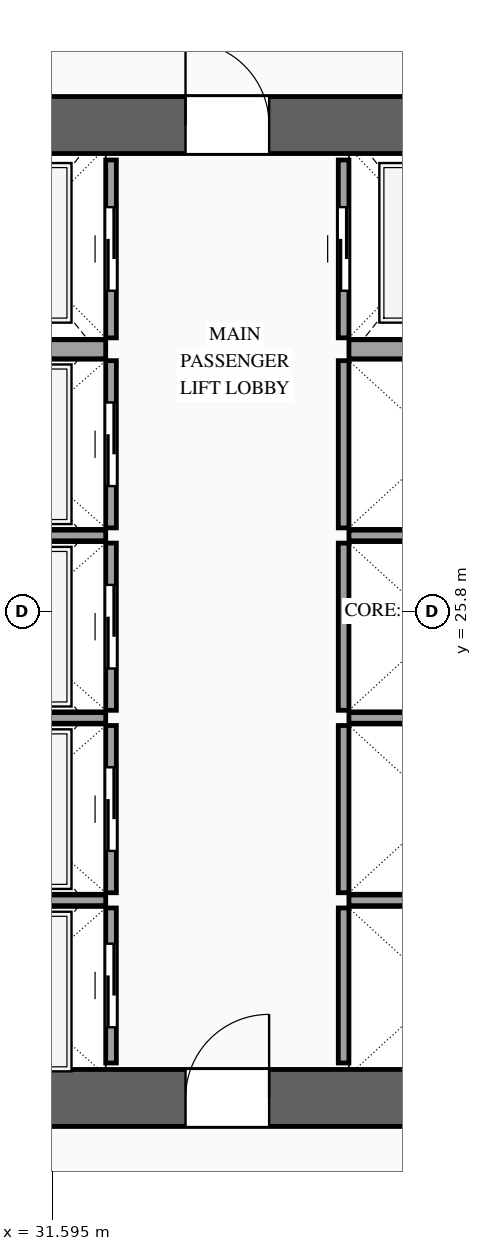
"""IFC4 building model, lengths in metres.
Left out: names, types, materials, properties, quantities, classifications, styles, units other than length and angle.
Written with IfcOpenShell. Run it as: python <this file> out.ifc"""

import sys

from ifc_helpers import new_model, si_unit, direction, frame, frame_2d, origin, place, context, subcontext, project, spatial, rectangle, extrude, source, transform, mapped, element, fill, save


model = new_model("IFC4")
c1 = context("Model", 3, precision=1e-05, world=origin(), true_north=direction((0.0, 1.0)))
c2 = subcontext(c1, "Body", "Model", "MODEL_VIEW")
j1 = project(units=[si_unit("LENGTHUNIT", "METRE"), si_unit("PLANEANGLEUNIT", "RADIAN")], contexts=[c1])
p1 = place(None, origin())
s1 = spatial("IfcSite", under=j1, at=p1, CompositionType="ELEMENT")
p2 = place(p1, origin())
s2 = spatial("IfcBuilding", under=s1, at=p2, CompositionType="ELEMENT")
p3 = place(p2, frame((0.0, 0.0, 85.6)))
s3 = spatial("IfcBuildingStorey", under=s2, at=p3, CompositionType="ELEMENT", Elevation=85.6)
p4 = place(p3, frame((23.425, 19.4, 0.0), z_axis=(0.0, 0.0, 1.0), x_axis=(1.0, 0.0, 0.0)))
e1 = element("IfcWall", 1, at=p4, inside=s3, PredefinedType="SHEAR", context=c2, shape_type="SweptSolid", body=[
    extrude(rectangle(XDim=27.15, YDim=0.75, at=frame_2d((13.575, 0.0))), origin(), (0.0, 0.0, 1.0), 4.6),
])
p5 = place(p4, frame((2.025, 0.0, 0.0)))
e2 = element("IfcOpeningElement", 2, at=p5, cuts=e1, PredefinedType="OPENING", context=c2, shape_type="SweptSolid", body=[
    extrude(rectangle(XDim=1.1, YDim=2.2, at=frame_2d((0.55, 1.1))), frame((0.0, 0.39, 0.0), z_axis=(0.0, -1.0, 0.0), x_axis=(1.0, 0.0, 0.0)), (0.0, 0.0, 1.0), 0.78),
])
p6 = place(p4, frame((9.925, 0.0, 0.0)))
e3 = element("IfcOpeningElement", 3, at=p6, cuts=e1, PredefinedType="OPENING", context=c2, shape_type="SweptSolid", body=[
    extrude(rectangle(XDim=1.1, YDim=2.2, at=frame_2d((0.55, 1.1))), frame((0.0, 0.39, 0.0), z_axis=(0.0, -1.0, 0.0), x_axis=(1.0, 0.0, 0.0)), (0.0, 0.0, 1.0), 0.78),
])
p7 = place(p4, frame((23.125, 0.0, 0.0)))
e4 = element("IfcOpeningElement", 4, at=p7, cuts=e1, PredefinedType="OPENING", context=c2, shape_type="SweptSolid", body=[
    extrude(rectangle(XDim=1.1, YDim=2.2, at=frame_2d((0.55, 1.1))), frame((0.0, 0.39, 0.0), z_axis=(0.0, -1.0, 0.0), x_axis=(1.0, 0.0, 0.0)), (0.0, 0.0, 1.0), 0.78),
])
p8 = place(p4, frame((19.745, 0.0, 0.0)))
e5 = element("IfcOpeningElement", 5, at=p8, cuts=e1, PredefinedType="OPENING", context=c2, shape_type="SweptSolid", body=[
    extrude(rectangle(XDim=0.9, YDim=2.15, at=frame_2d((0.45, 1.075))), frame((0.0, 0.39, 0.0), z_axis=(0.0, -1.0, 0.0), x_axis=(1.0, 0.0, 0.0)), (0.0, 0.0, 1.0), 0.78),
])
p9 = place(p3, frame((23.425, 32.2, 0.0), z_axis=(0.0, 0.0, 1.0), x_axis=(1.0, 0.0, 0.0)))
e6 = element("IfcWall", 6, at=p9, inside=s3, PredefinedType="SHEAR", context=c2, shape_type="SweptSolid", body=[
    extrude(rectangle(XDim=27.15, YDim=0.75, at=frame_2d((13.575, 0.0))), origin(), (0.0, 0.0, 1.0), 4.6),
])
p10 = place(p9, frame((4.645, 0.0, 0.0)))
e7 = element("IfcOpeningElement", 7, at=p10, cuts=e6, PredefinedType="OPENING", context=c2, shape_type="SweptSolid", body=[
    extrude(rectangle(XDim=0.9, YDim=2.15, at=frame_2d((0.45, 1.075))), frame((0.0, 0.39, 0.0), z_axis=(0.0, -1.0, 0.0), x_axis=(1.0, 0.0, 0.0)), (0.0, 0.0, 1.0), 0.78),
])
p11 = place(p9, frame((9.925, 0.0, 0.0)))
e8 = element("IfcOpeningElement", 8, at=p11, cuts=e6, PredefinedType="OPENING", context=c2, shape_type="SweptSolid", body=[
    extrude(rectangle(XDim=1.1, YDim=2.2, at=frame_2d((0.55, 1.1))), frame((0.0, 0.39, 0.0), z_axis=(0.0, -1.0, 0.0), x_axis=(1.0, 0.0, 0.0)), (0.0, 0.0, 1.0), 0.78),
])
p12 = place(p9, frame((15.775, 0.0, 0.0)))
e9 = element("IfcOpeningElement", 9, at=p12, cuts=e6, PredefinedType="OPENING", context=c2, shape_type="SweptSolid", body=[
    extrude(rectangle(XDim=1.1, YDim=2.2, at=frame_2d((0.55, 1.1))), frame((0.0, 0.39, 0.0), z_axis=(0.0, -1.0, 0.0), x_axis=(1.0, 0.0, 0.0)), (0.0, 0.0, 1.0), 0.78),
])
p13 = place(p9, frame((18.975, 0.0, 0.0)))
e10 = element("IfcOpeningElement", 10, at=p13, cuts=e6, PredefinedType="OPENING", context=c2, shape_type="SweptSolid", body=[
    extrude(rectangle(XDim=0.9, YDim=2.15, at=frame_2d((0.45, 1.075))), frame((0.0, 0.39, 0.0), z_axis=(0.0, -1.0, 0.0), x_axis=(1.0, 0.0, 0.0)), (0.0, 0.0, 1.0), 0.78),
])
p14 = place(p3, frame((32.37, 19.86, 0.0), z_axis=(0.0, 0.0, 1.0), x_axis=(0.0, 1.0, 0.0)))
e11 = element("IfcWall", 11, at=p14, inside=s3, PredefinedType="SOLIDWALL", context=c2, shape_type="SweptSolid", body=[
    extrude(rectangle(XDim=2.04, YDim=0.14, at=frame_2d((1.02, 0.0))), origin(), (0.0, 0.0, 1.0), 4.38),
])
p15 = place(p14, frame((0.47, 0.0, 0.0)))
e12 = element("IfcOpeningElement", 12, at=p15, cuts=e11, PredefinedType="OPENING", context=c2, shape_type="SweptSolid", body=[
    extrude(rectangle(XDim=1.1, YDim=2.2, at=frame_2d((0.55, 1.1))), frame((0.0, 0.085, 0.0), z_axis=(0.0, -1.0, 0.0), x_axis=(1.0, 0.0, 0.0)), (0.0, 0.0, 1.0), 0.17),
])
m1 = source(origin(), c2, "Body", "SweptSolid", [
    extrude(rectangle(XDim=2.5, YDim=0.14, at=frame_2d((1.25, 0.0))), origin(), (0.0, 0.0, 1.0), 4.38),
])
p16 = place(p3, frame((29.8, 22.0, 0.0), z_axis=(0.0, 0.0, 1.0), x_axis=(1.0, 0.0, 0.0)))
e13 = element("IfcWall", 13, at=p16, inside=s3, PredefinedType="SOLIDWALL", context=c2, shape_type="MappedRepresentation", body=[
    mapped(m1, transform((0.0, 0.0, 0.0), scale=1.0)),
])
p17 = place(p3, frame((32.37, 22.1, 0.0), z_axis=(0.0, 0.0, 1.0), x_axis=(0.0, 1.0, 0.0)))
e14 = element("IfcWall", 14, at=p17, inside=s3, PredefinedType="SOLIDWALL", context=c2, shape_type="SweptSolid", body=[
    extrude(rectangle(XDim=2.2, YDim=0.14, at=frame_2d((1.1, 0.0))), origin(), (0.0, 0.0, 1.0), 4.38),
])
p18 = place(p17, frame((0.55, 0.0, 0.0)))
e15 = element("IfcOpeningElement", 15, at=p18, cuts=e14, PredefinedType="OPENING", context=c2, shape_type="SweptSolid", body=[
    extrude(rectangle(XDim=1.1, YDim=2.2, at=frame_2d((0.55, 1.1))), frame((0.0, 0.085, 0.0), z_axis=(0.0, -1.0, 0.0), x_axis=(1.0, 0.0, 0.0)), (0.0, 0.0, 1.0), 0.17),
])
p19 = place(p3, frame((29.8, 24.4, 0.0), z_axis=(0.0, 0.0, 1.0), x_axis=(1.0, 0.0, 0.0)))
e16 = element("IfcWall", 16, at=p19, inside=s3, PredefinedType="SOLIDWALL", context=c2, shape_type="MappedRepresentation", body=[
    mapped(m1, transform((0.0, 0.0, 0.0), scale=1.0)),
])
p20 = place(p3, frame((32.37, 24.5, 0.0), z_axis=(0.0, 0.0, 1.0), x_axis=(0.0, 1.0, 0.0)))
e17 = element("IfcWall", 17, at=p20, inside=s3, PredefinedType="SOLIDWALL", context=c2, shape_type="SweptSolid", body=[
    extrude(rectangle(XDim=2.2, YDim=0.14, at=frame_2d((1.1, 0.0))), origin(), (0.0, 0.0, 1.0), 4.38),
])
p21 = place(p20, frame((0.55, 0.0, 0.0)))
e18 = element("IfcOpeningElement", 18, at=p21, cuts=e17, PredefinedType="OPENING", context=c2, shape_type="SweptSolid", body=[
    extrude(rectangle(XDim=1.1, YDim=2.2, at=frame_2d((0.55, 1.1))), frame((0.0, 0.085, 0.0), z_axis=(0.0, -1.0, 0.0), x_axis=(1.0, 0.0, 0.0)), (0.0, 0.0, 1.0), 0.17),
])
p22 = place(p3, frame((29.8, 26.8, 0.0), z_axis=(0.0, 0.0, 1.0), x_axis=(1.0, 0.0, 0.0)))
e19 = element("IfcWall", 19, at=p22, inside=s3, PredefinedType="SOLIDWALL", context=c2, shape_type="MappedRepresentation", body=[
    mapped(m1, transform((0.0, 0.0, 0.0), scale=1.0)),
])
p23 = place(p3, frame((32.37, 26.9, 0.0), z_axis=(0.0, 0.0, 1.0), x_axis=(0.0, 1.0, 0.0)))
e20 = element("IfcWall", 20, at=p23, inside=s3, PredefinedType="SOLIDWALL", context=c2, shape_type="SweptSolid", body=[
    extrude(rectangle(XDim=2.2, YDim=0.14, at=frame_2d((1.1, 0.0))), origin(), (0.0, 0.0, 1.0), 4.38),
])
p24 = place(p23, frame((0.55, 0.0, 0.0)))
e21 = element("IfcOpeningElement", 21, at=p24, cuts=e20, PredefinedType="OPENING", context=c2, shape_type="SweptSolid", body=[
    extrude(rectangle(XDim=1.1, YDim=2.2, at=frame_2d((0.55, 1.1))), frame((0.0, 0.085, 0.0), z_axis=(0.0, -1.0, 0.0), x_axis=(1.0, 0.0, 0.0)), (0.0, 0.0, 1.0), 0.17),
])
p25 = place(p3, frame((32.37, 29.4, 0.0), z_axis=(0.0, 0.0, 1.0), x_axis=(0.0, 1.0, 0.0)))
e22 = element("IfcWall", 22, at=p25, inside=s3, PredefinedType="SOLIDWALL", context=c2, shape_type="SweptSolid", body=[
    extrude(rectangle(XDim=2.34, YDim=0.14, at=frame_2d((1.17, 0.0))), origin(), (0.0, 0.0, 1.0), 4.38),
])
p26 = place(p25, frame((0.62, 0.0, 0.0)))
e23 = element("IfcOpeningElement", 23, at=p26, cuts=e22, PredefinedType="OPENING", context=c2, shape_type="SweptSolid", body=[
    extrude(rectangle(XDim=1.1, YDim=2.2, at=frame_2d((0.55, 1.1))), frame((0.0, 0.085, 0.0), z_axis=(0.0, -1.0, 0.0), x_axis=(1.0, 0.0, 0.0)), (0.0, 0.0, 1.0), 0.17),
])
m2 = source(origin(), c2, "Body", "SweptSolid", [
    extrude(rectangle(XDim=2.5, YDim=0.25, at=frame_2d((1.25, 0.0))), origin(), (0.0, 0.0, 1.0), 4.38),
])
p27 = place(p3, frame((29.8, 29.25, 0.0), z_axis=(0.0, 0.0, 1.0), x_axis=(1.0, 0.0, 0.0)))
e24 = element("IfcWall", 24, at=p27, inside=s3, PredefinedType="SOLIDWALL", context=c2, shape_type="MappedRepresentation", body=[
    mapped(m2, transform((0.0, 0.0, 0.0), scale=1.0)),
])
m3 = source(origin(), c2, "Body", "SweptSolid", [
    extrude(rectangle(XDim=2.04, YDim=0.14, at=frame_2d((1.02, 0.0))), origin(), (0.0, 0.0, 1.0), 4.38),
])
p28 = place(p3, frame((35.43, 19.86, 0.0), z_axis=(0.0, 0.0, 1.0), x_axis=(0.0, 1.0, 0.0)))
e25 = element("IfcWall", 25, at=p28, inside=s3, PredefinedType="SOLIDWALL", context=c2, shape_type="MappedRepresentation", body=[
    mapped(m3, transform((0.0, 0.0, 0.0), scale=1.0)),
])
m4 = source(origin(), c2, "Body", "SweptSolid", [
    extrude(rectangle(XDim=2.4, YDim=0.14, at=frame_2d((1.2, 0.0))), origin(), (0.0, 0.0, 1.0), 4.38),
])
p29 = place(p3, frame((35.5, 22.0, 0.0), z_axis=(0.0, 0.0, 1.0), x_axis=(1.0, 0.0, 0.0)))
e26 = element("IfcWall", 26, at=p29, inside=s3, PredefinedType="SOLIDWALL", context=c2, shape_type="MappedRepresentation", body=[
    mapped(m4, transform((0.0, 0.0, 0.0), scale=1.0)),
])
m5 = source(origin(), c2, "Body", "SweptSolid", [
    extrude(rectangle(XDim=2.2, YDim=0.14, at=frame_2d((1.1, 0.0))), origin(), (0.0, 0.0, 1.0), 4.38),
])
p30 = place(p3, frame((35.43, 22.1, 0.0), z_axis=(0.0, 0.0, 1.0), x_axis=(0.0, 1.0, 0.0)))
e27 = element("IfcWall", 27, at=p30, inside=s3, PredefinedType="SOLIDWALL", context=c2, shape_type="MappedRepresentation", body=[
    mapped(m5, transform((0.0, 0.0, 0.0), scale=1.0)),
])
p31 = place(p3, frame((35.5, 24.4, 0.0), z_axis=(0.0, 0.0, 1.0), x_axis=(1.0, 0.0, 0.0)))
e28 = element("IfcWall", 28, at=p31, inside=s3, PredefinedType="SOLIDWALL", context=c2, shape_type="MappedRepresentation", body=[
    mapped(m4, transform((0.0, 0.0, 0.0), scale=1.0)),
])
p32 = place(p3, frame((35.43, 24.5, 0.0), z_axis=(0.0, 0.0, 1.0), x_axis=(0.0, 1.0, 0.0)))
e29 = element("IfcWall", 29, at=p32, inside=s3, PredefinedType="SOLIDWALL", context=c2, shape_type="MappedRepresentation", body=[
    mapped(m5, transform((0.0, 0.0, 0.0), scale=1.0)),
])
p33 = place(p3, frame((35.5, 26.8, 0.0), z_axis=(0.0, 0.0, 1.0), x_axis=(1.0, 0.0, 0.0)))
e30 = element("IfcWall", 30, at=p33, inside=s3, PredefinedType="SOLIDWALL", context=c2, shape_type="MappedRepresentation", body=[
    mapped(m4, transform((0.0, 0.0, 0.0), scale=1.0)),
])
m6 = source(origin(), c2, "Body", "SweptSolid", [
    extrude(rectangle(XDim=2.2, YDim=0.14, at=frame_2d((1.1, 0.0))), origin(), (0.0, 0.0, 1.0), 4.38),
])
p34 = place(p3, frame((35.43, 26.9, 0.0), z_axis=(0.0, 0.0, 1.0), x_axis=(0.0, 1.0, 0.0)))
e31 = element("IfcWall", 31, at=p34, inside=s3, PredefinedType="SOLIDWALL", context=c2, shape_type="MappedRepresentation", body=[
    mapped(m6, transform((0.0, 0.0, 0.0), scale=1.0)),
])
p35 = place(p3, frame((35.43, 29.4, 0.0), z_axis=(0.0, 0.0, 1.0), x_axis=(0.0, 1.0, 0.0)))
e32 = element("IfcWall", 32, at=p35, inside=s3, PredefinedType="SOLIDWALL", context=c2, shape_type="SweptSolid", body=[
    extrude(rectangle(XDim=2.34, YDim=0.14, at=frame_2d((1.17, 0.0))), origin(), (0.0, 0.0, 1.0), 4.38),
])
p36 = place(p35, frame((0.62, 0.0, 0.0)))
e33 = element("IfcOpeningElement", 33, at=p36, cuts=e32, PredefinedType="OPENING", context=c2, shape_type="SweptSolid", body=[
    extrude(rectangle(XDim=1.1, YDim=2.2, at=frame_2d((0.55, 1.1))), frame((0.0, 0.085, 0.0), z_axis=(0.0, -1.0, 0.0), x_axis=(1.0, 0.0, 0.0)), (0.0, 0.0, 1.0), 0.17),
])
m7 = source(origin(), c2, "Body", "SweptSolid", [
    extrude(rectangle(XDim=2.4, YDim=0.25, at=frame_2d((1.2, 0.0))), origin(), (0.0, 0.0, 1.0), 4.38),
])
p37 = place(p3, frame((35.5, 29.25, 0.0), z_axis=(0.0, 0.0, 1.0), x_axis=(1.0, 0.0, 0.0)))
e34 = element("IfcWall", 34, at=p37, inside=s3, PredefinedType="SOLIDWALL", context=c2, shape_type="MappedRepresentation", body=[
    mapped(m7, transform((0.0, 0.0, 0.0), scale=1.0)),
])
m8 = source(origin(), c2, "Body", "SweptSolid", [
    extrude(rectangle(XDim=1.1, YDim=2.2, at=frame_2d((0.55, 1.1))), frame((0.0, 0.025, 0.0), z_axis=(0.0, -1.0, 0.0), x_axis=(1.0, 0.0, 0.0)), (0.0, 0.0, 1.0), 0.05),
])
p38 = place(p15, origin())
e35 = element("IfcDoor", 35, at=p38, inside=s3, OperationType="SLIDING_TO_LEFT", PredefinedType="DOOR", context=c2, shape_type="MappedRepresentation", body=[
    mapped(m8, transform((0.0, 0.0, 0.0), scale=1.0)),
])
fill(e12, e35)
p39 = place(p18, origin())
e36 = element("IfcDoor", 36, at=p39, inside=s3, OperationType="SLIDING_TO_RIGHT", PredefinedType="DOOR", context=c2, shape_type="MappedRepresentation", body=[
    mapped(m8, transform((0.0, 0.0, 0.0), scale=1.0)),
])
fill(e15, e36)
p40 = place(p21, origin())
e37 = element("IfcDoor", 37, at=p40, inside=s3, OperationType="SLIDING_TO_LEFT", PredefinedType="DOOR", context=c2, shape_type="MappedRepresentation", body=[
    mapped(m8, transform((0.0, 0.0, 0.0), scale=1.0)),
])
fill(e18, e37)
p41 = place(p24, origin())
e38 = element("IfcDoor", 38, at=p41, inside=s3, OperationType="SLIDING_TO_RIGHT", PredefinedType="DOOR", context=c2, shape_type="MappedRepresentation", body=[
    mapped(m8, transform((0.0, 0.0, 0.0), scale=1.0)),
])
fill(e21, e38)
p42 = place(p26, origin())
e39 = element("IfcDoor", 39, at=p42, inside=s3, OperationType="SLIDING_TO_LEFT", PredefinedType="DOOR", context=c2, shape_type="MappedRepresentation", body=[
    mapped(m8, transform((0.0, 0.0, 0.0), scale=1.0)),
])
fill(e23, e39)
p43 = place(p36, origin())
e40 = element("IfcDoor", 40, at=p43, inside=s3, OperationType="SLIDING_TO_RIGHT", PredefinedType="DOOR", context=c2, shape_type="MappedRepresentation", body=[
    mapped(m8, transform((0.0, 0.0, 0.0), scale=1.0)),
])
fill(e33, e40)
m9 = source(origin(), c2, "Body", "SweptSolid", [
    extrude(rectangle(XDim=1.1, YDim=2.2, at=frame_2d((0.55, 1.1))), frame((0.0, 0.025, 0.0), z_axis=(0.0, -1.0, 0.0), x_axis=(1.0, 0.0, 0.0)), (0.0, 0.0, 1.0), 0.05),
])
p44 = place(p6, origin())
e41 = element("IfcDoor", 41, at=p44, inside=s3, OperationType="SINGLE_SWING_RIGHT", PredefinedType="DOOR", context=c2, shape_type="MappedRepresentation", body=[
    mapped(m9, transform((0.0, 0.0, 0.0), scale=1.0)),
])
fill(e3, e41)
p45 = place(p11, origin())
e42 = element("IfcDoor", 42, at=p45, inside=s3, OperationType="SINGLE_SWING_LEFT", PredefinedType="DOOR", context=c2, shape_type="MappedRepresentation", body=[
    mapped(m9, transform((0.0, 0.0, 0.0), scale=1.0)),
])
fill(e8, e42)
save(model, sys.argv[1])
